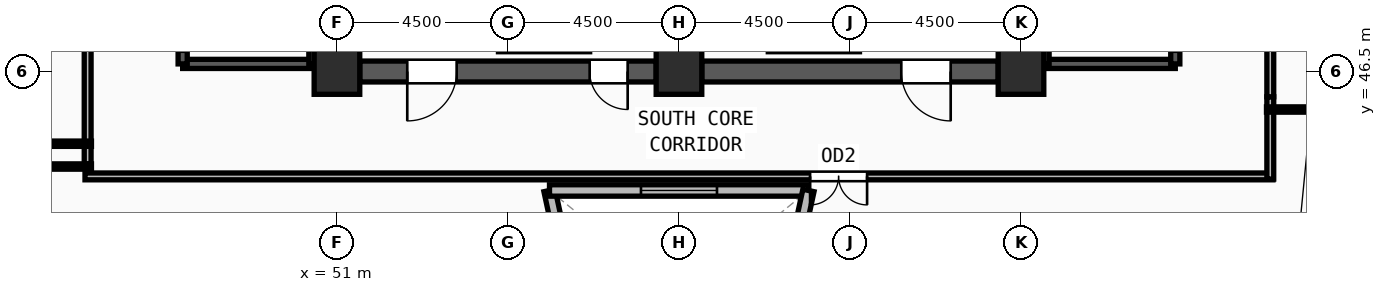
"""IFC4 building model, lengths in metres.
Left out: names, types, materials, properties, quantities, classifications, styles, units other than length and angle.
Written with IfcOpenShell. Run it as: python <this file> out.ifc"""

import sys

from ifc_helpers import new_model, si_unit, direction, frame, frame_2d, origin, origin_2d, place, context, subcontext, project, spatial, rectangle, extrude, source, transform, mapped, element, fill, save


model = new_model("IFC4")
c1 = context("Model", 3, precision=1e-05, world=origin(), true_north=direction((0.0, 1.0)))
c2 = subcontext(c1, "Body", "Model", "MODEL_VIEW")
j1 = project(units=[si_unit("LENGTHUNIT", "METRE"), si_unit("PLANEANGLEUNIT", "RADIAN")], contexts=[c1])
p1 = place(None, origin())
s1 = spatial("IfcSite", under=j1, at=p1, CompositionType="ELEMENT")
p2 = place(p1, origin())
s2 = spatial("IfcBuilding", under=s1, at=p2, CompositionType="ELEMENT")
p3 = place(p2, frame((0.0, 0.0, 320.25)))
s3 = spatial("IfcBuildingStorey", under=s2, at=p3, CompositionType="ELEMENT", Elevation=320.25)
m1 = source(origin(), c2, "Body", "SweptSolid", [
    extrude(rectangle(XDim=1.2, YDim=1.2, at=origin_2d()), origin(), (0.0, 0.0, 1.0), 3.75),
])
for number, where, z_axis, x_axis in (
    (1, (51.0, 46.5, 0.0), (0.0, 0.0, 1.0), (1.0, 0.0, 0.0)),
    (2, (60.0, 46.5, 0.0), (0.0, 0.0, 1.0), (1.0, 0.0, 0.0)),
    (3, (69.0, 46.5, 0.0), (0.0, 0.0, 1.0), (1.0, 0.0, 0.0)),
):
    element("IfcColumn", number, at=place(p3, frame(where, z_axis=z_axis, x_axis=x_axis)), inside=s3, PredefinedType="COLUMN", context=c2, shape_type="MappedRepresentation", body=[
        mapped(m1, transform((0.0, 0.0, 0.0), x_axis=(1.0, 0.0, 0.0), y_axis=(0.0, 1.0, 0.0), z_axis=(0.0, 0.0, 1.0), scale=1.0)),
    ])
p4 = place(p3, frame((40.336, 44.664, 0.0), z_axis=(0.0, 0.0, 1.0), x_axis=(0.557618008266, -0.830097679106, 0.0)))
e4 = element("IfcWall", 4, at=p4, inside=s3, PredefinedType="SOLIDWALL", context=c2, shape_type="SweptSolid", body=[
    extrude(rectangle(XDim=26.075, YDim=0.38, at=frame_2d((13.038, 0.0))), origin(), (0.0, 0.0, 1.0), 3.47),
])
m2 = source(origin(), c2, "Body", "SweptSolid", [
    extrude(rectangle(XDim=1.35, YDim=1.85, at=frame_2d((0.675, 0.925))), frame((0.0, 0.2, 0.0), z_axis=(0.0, -1.0, 0.0), x_axis=(1.0, 0.0, 0.0)), (0.0, 0.0, 1.0), 0.4),
])
p5 = place(p4, frame((5.844, 0.0, 0.55)))
e5 = element("IfcOpeningElement", 5, at=p5, cuts=e4, PredefinedType="OPENING", context=c2, shape_type="MappedRepresentation", body=[
    mapped(m2, transform((0.0, 0.0, 0.0), x_axis=(1.0, 0.0, 0.0), y_axis=(0.0, 1.0, 0.0), z_axis=(0.0, 0.0, 1.0), scale=1.0)),
])
p6 = place(p4, frame((12.363, 0.0, 0.55)))
e6 = element("IfcOpeningElement", 6, at=p6, cuts=e4, PredefinedType="OPENING", context=c2, shape_type="MappedRepresentation", body=[
    mapped(m2, transform((0.0, 0.0, 0.0), x_axis=(1.0, 0.0, 0.0), y_axis=(0.0, 1.0, 0.0), z_axis=(0.0, 0.0, 1.0), scale=1.0)),
])
p7 = place(p4, frame((18.881, 0.0, 0.55)))
e7 = element("IfcOpeningElement", 7, at=p7, cuts=e4, PredefinedType="OPENING", context=c2, shape_type="MappedRepresentation", body=[
    mapped(m2, transform((0.0, 0.0, 0.0), x_axis=(1.0, 0.0, 0.0), y_axis=(0.0, 1.0, 0.0), z_axis=(0.0, 0.0, 1.0), scale=1.0)),
])
p8 = place(p3, frame((68.4, 46.5, 0.0), z_axis=(0.0, 0.0, 1.0), x_axis=(-1.0, 0.0, 0.0)))
e8 = element("IfcWall", 8, at=p8, inside=s3, PredefinedType="SHEAR", context=c2, shape_type="SweptSolid", body=[
    extrude(rectangle(XDim=7.8, YDim=0.55, at=frame_2d((3.9, 0.0))), origin(), (0.0, 0.0, 1.0), 3.47),
])
m3 = source(origin(), c2, "Body", "SweptSolid", [
    extrude(rectangle(XDim=1.3, YDim=2.2, at=frame_2d((0.65, 1.1))), frame((0.0, 0.285, 0.0), z_axis=(0.0, -1.0, 0.0), x_axis=(1.0, 0.0, 0.0)), (0.0, 0.0, 1.0), 0.57),
])
p9 = place(p8, frame((1.25, 0.0, 0.0)))
e9 = element("IfcOpeningElement", 9, at=p9, cuts=e8, PredefinedType="OPENING", context=c2, shape_type="MappedRepresentation", body=[
    mapped(m3, transform((0.0, 0.0, 0.0), x_axis=(1.0, 0.0, 0.0), y_axis=(0.0, 1.0, 0.0), z_axis=(0.0, 0.0, 1.0), scale=1.0)),
])
p10 = place(p3, frame((59.4, 46.5, 0.0), z_axis=(0.0, 0.0, 1.0), x_axis=(-1.0, 0.0, 0.0)))
e10 = element("IfcWall", 10, at=p10, inside=s3, PredefinedType="SHEAR", context=c2, shape_type="SweptSolid", body=[
    extrude(rectangle(XDim=7.8, YDim=0.55, at=frame_2d((3.9, 0.0))), origin(), (0.0, 0.0, 1.0), 3.47),
])
p11 = place(p10, frame((5.25, 0.0, 0.0)))
e11 = element("IfcOpeningElement", 11, at=p11, cuts=e10, PredefinedType="OPENING", context=c2, shape_type="MappedRepresentation", body=[
    mapped(m3, transform((0.0, 0.0, 0.0), x_axis=(1.0, 0.0, 0.0), y_axis=(0.0, 1.0, 0.0), z_axis=(0.0, 0.0, 1.0), scale=1.0)),
])
m4 = source(origin(), c2, "Body", "SweptSolid", [
    extrude(rectangle(XDim=1.0, YDim=2.2, at=frame_2d((0.5, 1.1))), frame((0.0, 0.285, 0.0), z_axis=(0.0, -1.0, 0.0), x_axis=(1.0, 0.0, 0.0)), (0.0, 0.0, 1.0), 0.57),
])
p12 = place(p10, frame((0.75, 0.0, 0.0)))
e12 = element("IfcOpeningElement", 12, at=p12, cuts=e10, PredefinedType="OPENING", context=c2, shape_type="MappedRepresentation", body=[
    mapped(m4, transform((0.0, 0.0, 0.0), x_axis=(1.0, 0.0, 0.0), y_axis=(0.0, 1.0, 0.0), z_axis=(0.0, 0.0, 1.0), scale=1.0)),
])
p13 = place(p3, frame((46.94, 46.7, 0.0), z_axis=(0.0, 0.0, 1.0), x_axis=(1.0, 0.0, 0.0)))
e13 = element("IfcWall", 13, at=p13, inside=s3, PredefinedType="SOLIDWALL", context=c2, shape_type="SweptSolid", body=[
    extrude(rectangle(XDim=3.44, YDim=0.24, at=frame_2d((1.72, 0.0))), origin(), (0.0, 0.0, 1.0), 3.47),
])
p14 = place(p3, frame((50.38, 46.7, 0.0), z_axis=(0.0, 0.0, 1.0), x_axis=(0.0, 1.0, 0.0)))
e14 = element("IfcWall", 14, at=p14, inside=s3, PredefinedType="SOLIDWALL", context=c2, shape_type="SweptSolid", body=[
    extrude(rectangle(XDim=7.82, YDim=0.24, at=frame_2d((3.91, 0.0))), origin(), (0.0, 0.0, 1.0), 3.47),
])
p15 = place(p3, frame((46.94, 54.52, 0.0), z_axis=(0.0, 0.0, 1.0), x_axis=(0.0, -1.0, 0.0)))
e15 = element("IfcWall", 15, at=p15, inside=s3, PredefinedType="SOLIDWALL", context=c2, shape_type="SweptSolid", body=[
    extrude(rectangle(XDim=7.82, YDim=0.24, at=frame_2d((3.91, 0.0))), origin(), (0.0, 0.0, 1.0), 3.47),
])
m5 = source(origin(), c2, "Body", "SweptSolid", [
    extrude(rectangle(XDim=1.2, YDim=2.2, at=frame_2d((0.6, 1.1))), frame((0.0, 0.13, 0.0), z_axis=(0.0, -1.0, 0.0), x_axis=(1.0, 0.0, 0.0)), (0.0, 0.0, 1.0), 0.26),
])
p16 = place(p15, frame((6.3, 0.0, 0.0)))
e16 = element("IfcOpeningElement", 16, at=p16, cuts=e15, PredefinedType="OPENING", context=c2, shape_type="MappedRepresentation", body=[
    mapped(m5, transform((0.0, 0.0, 0.0), x_axis=(1.0, 0.0, 0.0), y_axis=(0.0, 1.0, 0.0), z_axis=(0.0, 0.0, 1.0), scale=1.0)),
])
p17 = place(p3, frame((69.62, 46.7, 0.0), z_axis=(0.0, 0.0, 1.0), x_axis=(1.0, 0.0, 0.0)))
e17 = element("IfcWall", 17, at=p17, inside=s3, PredefinedType="SOLIDWALL", context=c2, shape_type="SweptSolid", body=[
    extrude(rectangle(XDim=3.44, YDim=0.24, at=frame_2d((1.72, 0.0))), origin(), (0.0, 0.0, 1.0), 3.47),
])
p18 = place(p3, frame((73.06, 46.7, 0.0), z_axis=(0.0, 0.0, 1.0), x_axis=(0.0, 1.0, 0.0)))
e18 = element("IfcWall", 18, at=p18, inside=s3, PredefinedType="SOLIDWALL", context=c2, shape_type="SweptSolid", body=[
    extrude(rectangle(XDim=7.82, YDim=0.24, at=frame_2d((3.91, 0.0))), origin(), (0.0, 0.0, 1.0), 3.47),
])
p19 = place(p18, frame((0.32, 0.0, 0.0)))
e19 = element("IfcOpeningElement", 19, at=p19, cuts=e18, PredefinedType="OPENING", context=c2, shape_type="MappedRepresentation", body=[
    mapped(m5, transform((0.0, 0.0, 0.0), x_axis=(1.0, 0.0, 0.0), y_axis=(0.0, 1.0, 0.0), z_axis=(0.0, 0.0, 1.0), scale=1.0)),
])
p20 = place(p3, frame((69.62, 54.52, 0.0), z_axis=(0.0, 0.0, 1.0), x_axis=(0.0, -1.0, 0.0)))
e20 = element("IfcWall", 20, at=p20, inside=s3, PredefinedType="SOLIDWALL", context=c2, shape_type="SweptSolid", body=[
    extrude(rectangle(XDim=7.82, YDim=0.24, at=frame_2d((3.91, 0.0))), origin(), (0.0, 0.0, 1.0), 3.47),
])
p21 = place(p3, frame((57.786, 37.855, 0.0), z_axis=(0.0, 0.0, 1.0), x_axis=(-0.211402055263, 0.977399187144, 0.0)))
e21 = element("IfcWall", 21, at=p21, inside=s3, PredefinedType="SOLIDWALL", context=c2, shape_type="SweptSolid", body=[
    extrude(rectangle(XDim=5.643, YDim=0.3, at=frame_2d((2.821, 0.0))), origin(), (0.0, 0.0, 1.0), 3.47),
])
m6 = source(origin(), c2, "Body", "SweptSolid", [
    extrude(rectangle(XDim=2.0, YDim=1.9, at=frame_2d((1.0, 0.95))), frame((0.0, 0.16, 0.0), z_axis=(0.0, -1.0, 0.0), x_axis=(1.0, 0.0, 0.0)), (0.0, 0.0, 1.0), 0.32),
])
p22 = place(p21, frame((1.821, 0.0, 0.55)))
e22 = element("IfcOpeningElement", 22, at=p22, cuts=e21, PredefinedType="OPENING", context=c2, shape_type="MappedRepresentation", body=[
    mapped(m6, transform((0.0, 0.0, 0.0), x_axis=(1.0, 0.0, 0.0), y_axis=(0.0, 1.0, 0.0), z_axis=(0.0, 0.0, 1.0), scale=1.0)),
])
p23 = place(p3, frame((56.593, 43.37, 0.0), z_axis=(0.0, 0.0, 1.0), x_axis=(1.0, 0.0, 0.0)))
e23 = element("IfcWall", 23, at=p23, inside=s3, PredefinedType="SOLIDWALL", context=c2, shape_type="SweptSolid", body=[
    extrude(rectangle(XDim=6.814, YDim=0.3, at=frame_2d((3.407, 0.0))), origin(), (0.0, 0.0, 1.0), 3.47),
])
p24 = place(p23, frame((2.407, 0.0, 0.55)))
e24 = element("IfcOpeningElement", 24, at=p24, cuts=e23, PredefinedType="OPENING", context=c2, shape_type="MappedRepresentation", body=[
    mapped(m6, transform((0.0, 0.0, 0.0), x_axis=(1.0, 0.0, 0.0), y_axis=(0.0, 1.0, 0.0), z_axis=(0.0, 0.0, 1.0), scale=1.0)),
])
p25 = place(p3, frame((63.407, 43.37, 0.0), z_axis=(0.0, 0.0, 1.0), x_axis=(-0.211402055263, -0.977399187144, 0.0)))
e25 = element("IfcWall", 25, at=p25, inside=s3, PredefinedType="SOLIDWALL", context=c2, shape_type="SweptSolid", body=[
    extrude(rectangle(XDim=5.643, YDim=0.3, at=frame_2d((2.821, 0.0))), origin(), (0.0, 0.0, 1.0), 3.47),
])
p26 = place(p25, frame((1.821, 0.0, 0.55)))
e26 = element("IfcOpeningElement", 26, at=p26, cuts=e25, PredefinedType="OPENING", context=c2, shape_type="MappedRepresentation", body=[
    mapped(m6, transform((0.0, 0.0, 0.0), x_axis=(1.0, 0.0, 0.0), y_axis=(0.0, 1.0, 0.0), z_axis=(0.0, 0.0, 1.0), scale=1.0)),
])
p27 = place(p3, frame((44.44, 44.07, 0.0), z_axis=(0.0, 0.0, 1.0), x_axis=(0.0, 1.0, 0.0)))
e27 = element("IfcWall", 27, at=p27, inside=s3, PredefinedType="PARTITIONING", context=c2, shape_type="SweptSolid", body=[
    extrude(rectangle(XDim=7.215, YDim=0.18, at=frame_2d((3.607, 0.0))), origin(), (0.0, 0.0, 1.0), 3.47),
])
m7 = source(origin(), c2, "Body", "SweptSolid", [
    extrude(rectangle(XDim=1.0, YDim=2.2, at=frame_2d((0.5, 1.1))), frame((0.0, 0.1, 0.0), z_axis=(0.0, -1.0, 0.0), x_axis=(1.0, 0.0, 0.0)), (0.0, 0.0, 1.0), 0.2),
])
p28 = place(p27, frame((3.265, 0.0, 0.0)))
e28 = element("IfcOpeningElement", 28, at=p28, cuts=e27, PredefinedType="OPENING", context=c2, shape_type="MappedRepresentation", body=[
    mapped(m7, transform((0.0, 0.0, 0.0), x_axis=(1.0, 0.0, 0.0), y_axis=(0.0, 1.0, 0.0), z_axis=(0.0, 0.0, 1.0), scale=1.0)),
])
p29 = place(p3, frame((75.63, 43.74, 0.0), z_axis=(0.0, 0.0, 1.0), x_axis=(-1.0, 0.0, 0.0)))
e29 = element("IfcWall", 29, at=p29, inside=s3, PredefinedType="PARTITIONING", context=c2, shape_type="SweptSolid", body=[
    extrude(rectangle(XDim=31.26, YDim=0.18, at=frame_2d((15.63, 0.0))), origin(), (0.0, 0.0, 1.0), 3.47),
])
m8 = source(origin(), c2, "Body", "SweptSolid", [
    extrude(rectangle(XDim=1.5, YDim=2.2, at=frame_2d((0.75, 1.1))), frame((0.0, 0.1, 0.0), z_axis=(0.0, -1.0, 0.0), x_axis=(1.0, 0.0, 0.0)), (0.0, 0.0, 1.0), 0.2),
])
p30 = place(p29, frame((10.68, 0.0, 0.0)))
e30 = element("IfcOpeningElement", 30, at=p30, cuts=e29, PredefinedType="OPENING", context=c2, shape_type="MappedRepresentation", body=[
    mapped(m8, transform((0.0, 0.0, 0.0), x_axis=(1.0, 0.0, 0.0), y_axis=(0.0, 1.0, 0.0), z_axis=(0.0, 0.0, 1.0), scale=1.0)),
])
p31 = place(p3, frame((75.56, 45.835, 0.0), z_axis=(0.0, 0.0, 1.0), x_axis=(0.0, -1.0, 0.0)))
e31 = element("IfcWall", 31, at=p31, inside=s3, PredefinedType="PARTITIONING", context=c2, shape_type="SweptSolid", body=[
    extrude(rectangle(XDim=2.165, YDim=0.18, at=frame_2d((1.083, 0.0))), origin(), (0.0, 0.0, 1.0), 3.47),
])
p32 = place(p3, frame((75.56, 48.21, 0.0), z_axis=(0.0, 0.0, 1.0), x_axis=(0.0, -1.0, 0.0)))
e32 = element("IfcWall", 32, at=p32, inside=s3, PredefinedType="PARTITIONING", context=c2, shape_type="SweptSolid", body=[
    extrude(rectangle(XDim=2.375, YDim=0.18, at=frame_2d((1.188, 0.0))), origin(), (0.0, 0.0, 1.0), 3.47),
])
p33 = place(p3, frame((44.54, 44.0, 0.0), z_axis=(0.0, 0.0, 1.0), x_axis=(-1.0, 0.0, 0.0)))
e33 = element("IfcWall", 33, at=p33, inside=s3, PredefinedType="PARTITIONING", context=c2, shape_type="SweptSolid", body=[
    extrude(rectangle(XDim=4.517, YDim=0.14, at=frame_2d((2.259, 0.0))), origin(), (0.0, 0.0, 1.0), 3.47),
])
p34 = place(p3, frame((44.54, 44.6, 0.0), z_axis=(0.0, 0.0, 1.0), x_axis=(-1.0, 0.0, 0.0)))
e34 = element("IfcWall", 34, at=p34, inside=s3, PredefinedType="PARTITIONING", context=c2, shape_type="SweptSolid", body=[
    extrude(rectangle(XDim=4.92, YDim=0.14, at=frame_2d((2.46, 0.0))), origin(), (0.0, 0.0, 1.0), 3.47),
])
p35 = place(p3, frame((75.46, 45.5, 0.0), z_axis=(0.0, 0.0, 1.0), x_axis=(1.0, 0.0, 0.0)))
e35 = element("IfcWall", 35, at=p35, inside=s3, PredefinedType="PARTITIONING", context=c2, shape_type="SweptSolid", body=[
    extrude(rectangle(XDim=5.051, YDim=0.14, at=frame_2d((2.525, 0.0))), origin(), (0.0, 0.0, 1.0), 3.47),
])
m9 = source(origin(), c2, "Body", "SweptSolid", [
    extrude(rectangle(XDim=1.3, YDim=2.2, at=frame_2d((0.65, 1.1))), frame((0.0, 0.025, 0.0), z_axis=(0.0, -1.0, 0.0), x_axis=(1.0, 0.0, 0.0)), (0.0, 0.0, 1.0), 0.05),
])
p36 = place(p11, origin())
e36 = element("IfcDoor", 36, at=p36, inside=s3, OperationType="SINGLE_SWING_RIGHT", PredefinedType="DOOR", context=c2, shape_type="MappedRepresentation", body=[
    mapped(m9, transform((0.0, 0.0, 0.0), x_axis=(1.0, 0.0, 0.0), y_axis=(0.0, 1.0, 0.0), z_axis=(0.0, 0.0, 1.0), scale=1.0)),
])
fill(e11, e36)
m10 = source(origin(), c2, "Body", "SweptSolid", [
    extrude(rectangle(XDim=1.0, YDim=2.2, at=frame_2d((0.5, 1.1))), frame((0.0, 0.025, 0.0), z_axis=(0.0, -1.0, 0.0), x_axis=(1.0, 0.0, 0.0)), (0.0, 0.0, 1.0), 0.05),
])
p37 = place(p12, origin())
e37 = element("IfcDoor", 37, at=p37, inside=s3, OperationType="SINGLE_SWING_LEFT", PredefinedType="DOOR", context=c2, shape_type="MappedRepresentation", body=[
    mapped(m10, transform((0.0, 0.0, 0.0), x_axis=(1.0, 0.0, 0.0), y_axis=(0.0, 1.0, 0.0), z_axis=(0.0, 0.0, 1.0), scale=1.0)),
])
fill(e12, e37)
p38 = place(p9, origin())
e38 = element("IfcDoor", 38, at=p38, inside=s3, OperationType="SINGLE_SWING_LEFT", PredefinedType="DOOR", context=c2, shape_type="MappedRepresentation", body=[
    mapped(m9, transform((0.0, 0.0, 0.0), x_axis=(1.0, 0.0, 0.0), y_axis=(0.0, 1.0, 0.0), z_axis=(0.0, 0.0, 1.0), scale=1.0)),
])
fill(e9, e38)
m11 = source(origin(), c2, "Body", "SweptSolid", [
    extrude(rectangle(XDim=2.0, YDim=1.9, at=frame_2d((1.0, 0.95))), frame((0.0, 0.03, 0.0), z_axis=(0.0, -1.0, 0.0), x_axis=(1.0, 0.0, 0.0)), (0.0, 0.0, 1.0), 0.06),
])
p39 = place(p24, origin())
e39 = element("IfcWindow", 39, at=p39, inside=s3, PartitioningType="DOUBLE_PANEL_VERTICAL", PredefinedType="WINDOW", context=c2, shape_type="MappedRepresentation", body=[
    mapped(m11, transform((0.0, 0.0, 0.0), x_axis=(1.0, 0.0, 0.0), y_axis=(0.0, 1.0, 0.0), z_axis=(0.0, 0.0, 1.0), scale=1.0)),
])
fill(e24, e39)
m12 = source(origin(), c2, "Body", "SweptSolid", [
    extrude(rectangle(XDim=1.5, YDim=2.2, at=frame_2d((0.75, 1.1))), frame((0.0, 0.025, 0.0), z_axis=(0.0, -1.0, 0.0), x_axis=(1.0, 0.0, 0.0)), (0.0, 0.0, 1.0), 0.05),
])
p40 = place(p30, origin())
e40 = element("IfcDoor", 40, at=p40, inside=s3, OperationType="DOUBLE_DOOR_SINGLE_SWING", PredefinedType="DOOR", context=c2, shape_type="MappedRepresentation", body=[
    mapped(m12, transform((0.0, 0.0, 0.0), x_axis=(1.0, 0.0, 0.0), y_axis=(0.0, 1.0, 0.0), z_axis=(0.0, 0.0, 1.0), scale=1.0)),
])
fill(e30, e40)
save(model, sys.argv[1])
